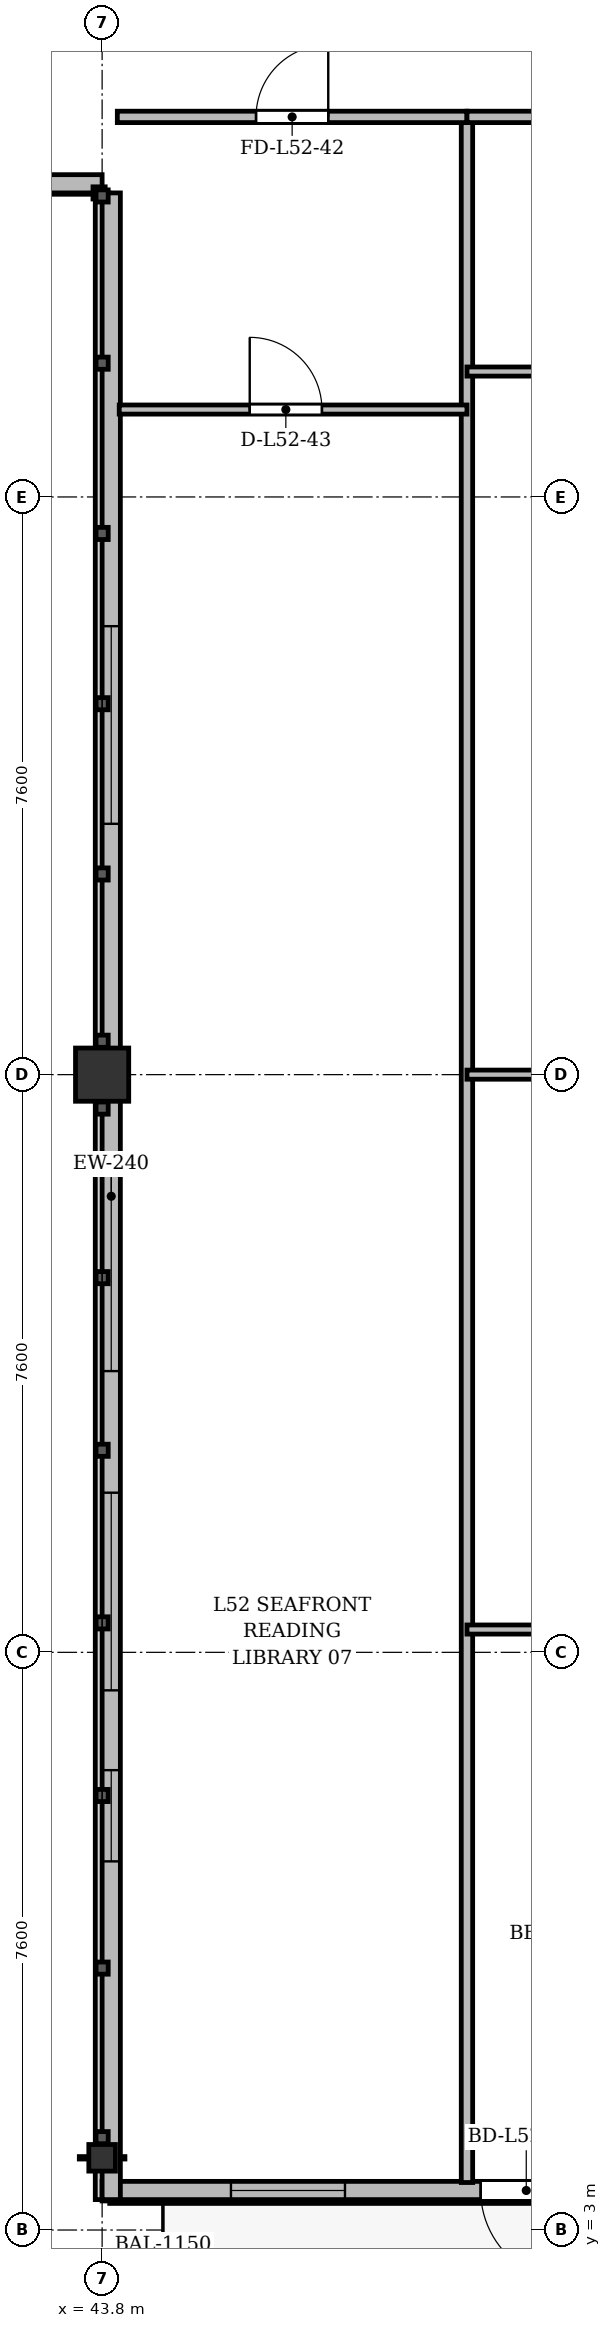
"""IFC4 building model, lengths in metres.
Left out: names, types, materials, properties, quantities, classifications, styles, units other than length and angle.
Written with IfcOpenShell. Run it as: python <this file> out.ifc"""

import sys

from ifc_helpers import new_model, si_unit, direction, frame, frame_2d, origin, origin_2d, place, context, subcontext, project, spatial, rectangle, i_section, extrude, source, transform, mapped, element, fill, save


model = new_model("IFC4")
c1 = context("Model", 3, precision=1e-05, world=origin(), true_north=direction((0.0, 1.0)))
c2 = subcontext(c1, "Body", "Model", "MODEL_VIEW")
j1 = project(units=[si_unit("LENGTHUNIT", "METRE"), si_unit("PLANEANGLEUNIT", "RADIAN")], contexts=[c1])
p1 = place(None, origin())
s1 = spatial("IfcSite", under=j1, at=p1, CompositionType="ELEMENT")
p2 = place(p1, origin())
s2 = spatial("IfcBuilding", under=s1, at=p2, CompositionType="ELEMENT")
p3 = place(p2, frame((0.0, 0.0, 201.3)))
s3 = spatial("IfcBuildingStorey", under=s2, at=p3, CompositionType="ELEMENT", Elevation=201.3)
m1 = source(origin(), c2, "Body", "SweptSolid", [
    extrude(i_section(OverallWidth=0.35, OverallDepth=0.35, WebThickness=0.018, FlangeThickness=0.028, at=origin_2d()), origin(), (0.0, 0.0, 1.0), 3.6),
])
p4 = place(p3, frame((43.8, 3.95, 0.0), z_axis=(0.0, 0.0, 1.0), x_axis=(1.0, 0.0, 0.0)))
e1 = element("IfcColumn", 1, at=p4, inside=s3, PredefinedType="COLUMN", context=c2, shape_type="MappedRepresentation", body=[
    mapped(m1, transform((0.0, 0.0, 0.0), x_axis=(1.0, 0.0, 0.0), y_axis=(0.0, 1.0, 0.0), z_axis=(0.0, 0.0, 1.0), scale=1.0)),
])
m2 = source(origin(), c2, "Body", "SweptSolid", [
    extrude(rectangle(XDim=0.7, YDim=0.7, at=origin_2d()), origin(), (0.0, 0.0, 1.0), 3.6),
])
p5 = place(p3, frame((43.8, 18.2, 0.0), z_axis=(0.0, 0.0, 1.0), x_axis=(1.0, 0.0, 0.0)))
e2 = element("IfcColumn", 2, at=p5, inside=s3, PredefinedType="COLUMN", context=c2, shape_type="MappedRepresentation", body=[
    mapped(m2, transform((0.0, 0.0, 0.0), x_axis=(1.0, 0.0, 0.0), y_axis=(0.0, 1.0, 0.0), z_axis=(0.0, 0.0, 1.0), scale=1.0)),
])
p6 = place(p3, frame((63.4, 3.52, 0.0), z_axis=(0.0, 0.0, 1.0), x_axis=(-1.0, 0.0, 0.0)))
e3 = element("IfcWall", 3, at=p6, inside=s3, PredefinedType="SOLIDWALL", context=c2, shape_type="SweptSolid", body=[
    extrude(rectangle(XDim=19.6, YDim=0.24, at=frame_2d((9.8, 0.0))), origin(), (0.0, 0.0, 1.0), 3.22),
])
p7 = place(p6, frame((0.395, 0.0, 0.9)))
e4 = element("IfcOpeningElement", 4, at=p7, cuts=e3, PredefinedType="OPENING", context=c2, shape_type="SweptSolid", body=[
    extrude(rectangle(XDim=0.9, YDim=1.65, at=frame_2d((0.45, 0.825))), frame((0.0, 0.13, 0.0), z_axis=(0.0, -1.0, 0.0), x_axis=(1.0, 0.0, 0.0)), (0.0, 0.0, 1.0), 0.26),
])
p8 = place(p6, frame((3.4, 0.0, 0.9)))
e5 = element("IfcOpeningElement", 5, at=p8, cuts=e3, PredefinedType="OPENING", context=c2, shape_type="SweptSolid", body=[
    extrude(rectangle(XDim=2.0, YDim=1.95, at=frame_2d((1.0, 0.975))), frame((0.0, 0.13, 0.0), z_axis=(0.0, -1.0, 0.0), x_axis=(1.0, 0.0, 0.0)), (0.0, 0.0, 1.0), 0.26),
])
p9 = place(p6, frame((7.45, 0.0, 0.9)))
e6 = element("IfcOpeningElement", 6, at=p9, cuts=e3, PredefinedType="OPENING", context=c2, shape_type="SweptSolid", body=[
    extrude(rectangle(XDim=1.5, YDim=1.75, at=frame_2d((0.75, 0.875))), frame((0.0, 0.13, 0.0), z_axis=(0.0, -1.0, 0.0), x_axis=(1.0, 0.0, 0.0)), (0.0, 0.0, 1.0), 0.26),
])
p10 = place(p6, frame((9.7, 0.0, 0.9)))
e7 = element("IfcOpeningElement", 7, at=p10, cuts=e3, PredefinedType="OPENING", context=c2, shape_type="SweptSolid", body=[
    extrude(rectangle(XDim=1.8, YDim=1.8, at=frame_2d((0.9, 0.9))), frame((0.0, 0.13, 0.0), z_axis=(0.0, -1.0, 0.0), x_axis=(1.0, 0.0, 0.0)), (0.0, 0.0, 1.0), 0.26),
])
p11 = place(p6, frame((13.42, 0.0, 0.0)))
e8 = element("IfcOpeningElement", 8, at=p11, cuts=e3, PredefinedType="OPENING", context=c2, shape_type="SweptSolid", body=[
    extrude(rectangle(XDim=1.2, YDim=2.2, at=frame_2d((0.6, 1.1))), frame((0.0, 0.13, 0.0), z_axis=(0.0, -1.0, 0.0), x_axis=(1.0, 0.0, 0.0)), (0.0, 0.0, 1.0), 0.26),
])
p12 = place(p6, frame((16.405, 0.0, 0.9)))
e9 = element("IfcOpeningElement", 9, at=p12, cuts=e3, PredefinedType="OPENING", context=c2, shape_type="SweptSolid", body=[
    extrude(rectangle(XDim=1.5, YDim=1.75, at=frame_2d((0.75, 0.875))), frame((0.0, 0.13, 0.0), z_axis=(0.0, -1.0, 0.0), x_axis=(1.0, 0.0, 0.0)), (0.0, 0.0, 1.0), 0.26),
])
p13 = place(p3, frame((43.92, 3.4, 0.0), z_axis=(0.0, 0.0, 1.0), x_axis=(0.0, 1.0, 0.0)))
e10 = element("IfcWall", 10, at=p13, inside=s3, PredefinedType="SOLIDWALL", context=c2, shape_type="SweptSolid", body=[
    extrude(rectangle(XDim=26.4, YDim=0.24, at=frame_2d((13.2, 0.0))), origin(), (0.0, 0.0, 1.0), 2.72),
])
p14 = place(p13, frame((4.45, 0.0, 0.92)))
e11 = element("IfcOpeningElement", 11, at=p14, cuts=e10, PredefinedType="OPENING", context=c2, shape_type="SweptSolid", body=[
    extrude(rectangle(XDim=1.2, YDim=1.65, at=frame_2d((0.6, 0.825))), frame((0.0, 0.13, 0.0), z_axis=(0.0, -1.0, 0.0), x_axis=(1.0, 0.0, 0.0)), (0.0, 0.0, 1.0), 0.26),
])
p15 = place(p13, frame((6.7, 0.0, 0.92)))
e12 = element("IfcOpeningElement", 12, at=p15, cuts=e10, PredefinedType="OPENING", context=c2, shape_type="SweptSolid", body=[
    extrude(rectangle(XDim=2.6, YDim=1.7, at=frame_2d((1.3, 0.85))), frame((0.0, 0.13, 0.0), z_axis=(0.0, -1.0, 0.0), x_axis=(1.0, 0.0, 0.0)), (0.0, 0.0, 1.0), 0.26),
])
p16 = place(p13, frame((10.9, 0.0, 0.92)))
e13 = element("IfcOpeningElement", 13, at=p16, cuts=e10, PredefinedType="OPENING", context=c2, shape_type="SweptSolid", body=[
    extrude(rectangle(XDim=2.6, YDim=1.7, at=frame_2d((1.3, 0.85))), frame((0.0, 0.13, 0.0), z_axis=(0.0, -1.0, 0.0), x_axis=(1.0, 0.0, 0.0)), (0.0, 0.0, 1.0), 0.26),
])
p17 = place(p13, frame((18.1, 0.0, 0.92)))
e14 = element("IfcOpeningElement", 14, at=p17, cuts=e10, PredefinedType="OPENING", context=c2, shape_type="SweptSolid", body=[
    extrude(rectangle(XDim=2.6, YDim=1.7, at=frame_2d((1.3, 0.85))), frame((0.0, 0.13, 0.0), z_axis=(0.0, -1.0, 0.0), x_axis=(1.0, 0.0, 0.0)), (0.0, 0.0, 1.0), 0.26),
])
p18 = place(p3, frame((43.8, 29.92, 0.0), z_axis=(0.0, 0.0, 1.0), x_axis=(-1.0, 0.0, 0.0)))
e15 = element("IfcWall", 15, at=p18, inside=s3, PredefinedType="SOLIDWALL", context=c2, shape_type="SweptSolid", body=[
    extrude(rectangle(XDim=13.2, YDim=0.24, at=frame_2d((6.6, 0.0))), origin(), (0.0, 0.0, 1.0), 2.72),
])
p19 = place(p18, frame((5.85, 0.0, 0.9)))
e16 = element("IfcOpeningElement", 16, at=p19, cuts=e15, PredefinedType="OPENING", context=c2, shape_type="SweptSolid", body=[
    extrude(rectangle(XDim=1.5, YDim=1.72, at=frame_2d((0.75, 0.86))), frame((0.0, 0.13, 0.0), z_axis=(0.0, -1.0, 0.0), x_axis=(1.0, 0.0, 0.0)), (0.0, 0.0, 1.0), 0.26),
])
p20 = place(p3, frame((48.6, 3.625, 0.0), z_axis=(0.0, 0.0, 1.0), x_axis=(0.0, 1.0, 0.0)))
e17 = element("IfcWall", 17, at=p20, inside=s3, PredefinedType="PARTITIONING", context=c2, shape_type="SweptSolid", body=[
    extrude(rectangle(XDim=27.175, YDim=0.15, at=frame_2d((13.587, 0.0))), origin(), (0.0, 0.0, 1.0), 2.77),
])
p21 = place(p3, frame((44.0, 30.8, 0.0), z_axis=(0.0, 0.0, 1.0), x_axis=(1.0, 0.0, 0.0)))
e18 = element("IfcWall", 18, at=p21, inside=s3, PredefinedType="PARTITIONING", context=c2, shape_type="SweptSolid", body=[
    extrude(rectangle(XDim=4.6, YDim=0.15, at=frame_2d((2.3, 0.0))), origin(), (0.0, 0.0, 1.0), 3.22),
])
p22 = place(p21, frame((1.825, 0.0, 0.0)))
e19 = element("IfcOpeningElement", 19, at=p22, cuts=e18, PredefinedType="OPENING", context=c2, shape_type="SweptSolid", body=[
    extrude(rectangle(XDim=0.95, YDim=2.15, at=frame_2d((0.475, 1.075))), frame((0.0, 0.085, 0.0), z_axis=(0.0, -1.0, 0.0), x_axis=(1.0, 0.0, 0.0)), (0.0, 0.0, 1.0), 0.17),
])
p23 = place(p3, frame((44.025, 26.95, 0.0), z_axis=(0.0, 0.0, 1.0), x_axis=(1.0, 0.0, 0.0)))
e20 = element("IfcWall", 20, at=p23, inside=s3, PredefinedType="PARTITIONING", context=c2, shape_type="SweptSolid", body=[
    extrude(rectangle(XDim=4.575, YDim=0.12, at=frame_2d((2.288, 0.0))), origin(), (0.0, 0.0, 1.0), 3.22),
])
p24 = place(p23, frame((1.717, 0.0, 0.0)))
e21 = element("IfcOpeningElement", 21, at=p24, cuts=e20, PredefinedType="OPENING", context=c2, shape_type="SweptSolid", body=[
    extrude(rectangle(XDim=0.95, YDim=2.15, at=frame_2d((0.475, 1.075))), frame((0.0, 0.07, 0.0), z_axis=(0.0, -1.0, 0.0), x_axis=(1.0, 0.0, 0.0)), (0.0, 0.0, 1.0), 0.14),
])
p25 = place(p3, frame((48.6, 18.2, 0.0), z_axis=(0.0, 0.0, 1.0), x_axis=(1.0, 0.0, 0.0)))
e22 = element("IfcWall", 22, at=p25, inside=s3, PredefinedType="PARTITIONING", context=c2, shape_type="SweptSolid", body=[
    extrude(rectangle(XDim=5.6, YDim=0.12, at=frame_2d((2.8, 0.0))), origin(), (0.0, 0.0, 1.0), 2.77),
])
p26 = place(p25, frame((3.344, 0.0, 0.0)))
e23 = element("IfcOpeningElement", 23, at=p26, cuts=e22, PredefinedType="OPENING", context=c2, shape_type="SweptSolid", body=[
    extrude(rectangle(XDim=0.95, YDim=2.15, at=frame_2d((0.475, 1.075))), frame((0.0, 0.07, 0.0), z_axis=(0.0, -1.0, 0.0), x_axis=(1.0, 0.0, 0.0)), (0.0, 0.0, 1.0), 0.14),
])
p27 = place(p3, frame((48.6, 27.45, 0.0), z_axis=(0.0, 0.0, 1.0), x_axis=(1.0, 0.0, 0.0)))
e24 = element("IfcWall", 24, at=p27, inside=s3, PredefinedType="PARTITIONING", context=c2, shape_type="SweptSolid", body=[
    extrude(rectangle(XDim=1.954, YDim=0.12, at=frame_2d((0.977, 0.0))), origin(), (0.0, 0.0, 1.0), 3.22),
])
p28 = place(p3, frame((48.6, 30.8, 0.0), z_axis=(0.0, 0.0, 1.0), x_axis=(1.0, 0.0, 0.0)))
e25 = element("IfcWall", 25, at=p28, inside=s3, PredefinedType="PARTITIONING", context=c2, shape_type="SweptSolid", body=[
    extrude(rectangle(XDim=5.6, YDim=0.15, at=frame_2d((2.8, 0.0))), origin(), (0.0, 0.0, 1.0), 2.72),
])
p29 = place(p28, frame((3.492, 0.0, 0.0)))
e26 = element("IfcOpeningElement", 26, at=p29, cuts=e25, PredefinedType="OPENING", context=c2, shape_type="SweptSolid", body=[
    extrude(rectangle(XDim=0.95, YDim=2.15, at=frame_2d((0.475, 1.075))), frame((0.0, 0.085, 0.0), z_axis=(0.0, -1.0, 0.0), x_axis=(1.0, 0.0, 0.0)), (0.0, 0.0, 1.0), 0.17),
])
p30 = place(p3, frame((48.6, 10.9, 0.0), z_axis=(0.0, 0.0, 1.0), x_axis=(1.0, 0.0, 0.0)))
e27 = element("IfcWall", 27, at=p30, inside=s3, PredefinedType="PARTITIONING", context=c2, shape_type="SweptSolid", body=[
    extrude(rectangle(XDim=2.8, YDim=0.12, at=frame_2d((1.4, 0.0))), origin(), (0.0, 0.0, 1.0), 2.72),
])
p31 = place(p30, frame((0.925, 0.0, 0.0)))
e28 = element("IfcOpeningElement", 28, at=p31, cuts=e27, PredefinedType="OPENING", context=c2, shape_type="SweptSolid", body=[
    extrude(rectangle(XDim=0.95, YDim=2.15, at=frame_2d((0.475, 1.075))), frame((0.0, 0.07, 0.0), z_axis=(0.0, -1.0, 0.0), x_axis=(1.0, 0.0, 0.0)), (0.0, 0.0, 1.0), 0.14),
])
m3 = source(origin(), c2, "Body", "SweptSolid", [
    extrude(rectangle(XDim=1.2, YDim=2.2, at=frame_2d((0.6, 1.1))), frame((0.0, 0.025, 0.0), z_axis=(0.0, -1.0, 0.0), x_axis=(1.0, 0.0, 0.0)), (0.0, 0.0, 1.0), 0.05),
])
p32 = place(p11, origin())
e29 = element("IfcDoor", 29, at=p32, inside=s3, OperationType="SINGLE_SWING_LEFT", PredefinedType="DOOR", context=c2, shape_type="MappedRepresentation", body=[
    mapped(m3, transform((0.0, 0.0, 0.0), x_axis=(1.0, 0.0, 0.0), y_axis=(0.0, 1.0, 0.0), z_axis=(0.0, 0.0, 1.0), scale=1.0)),
])
fill(e8, e29)
m4 = source(origin(), c2, "Body", "SweptSolid", [
    extrude(rectangle(XDim=1.5, YDim=1.75, at=frame_2d((0.75, 0.875))), frame((0.0, 0.03, 0.0), z_axis=(0.0, -1.0, 0.0), x_axis=(1.0, 0.0, 0.0)), (0.0, 0.0, 1.0), 0.06),
])
p33 = place(p12, origin())
e30 = element("IfcWindow", 30, at=p33, inside=s3, PartitioningType="SINGLE_PANEL", PredefinedType="WINDOW", context=c2, shape_type="MappedRepresentation", body=[
    mapped(m4, transform((0.0, 0.0, 0.0), x_axis=(1.0, 0.0, 0.0), y_axis=(0.0, 1.0, 0.0), z_axis=(0.0, 0.0, 1.0), scale=1.0)),
])
fill(e9, e30)
m5 = source(origin(), c2, "Body", "SweptSolid", [
    extrude(rectangle(XDim=1.2, YDim=1.65, at=frame_2d((0.6, 0.825))), frame((0.0, 0.03, 0.0), z_axis=(0.0, -1.0, 0.0), x_axis=(1.0, 0.0, 0.0)), (0.0, 0.0, 1.0), 0.06),
])
p34 = place(p14, origin())
e31 = element("IfcWindow", 31, at=p34, inside=s3, PartitioningType="SINGLE_PANEL", PredefinedType="WINDOW", context=c2, shape_type="MappedRepresentation", body=[
    mapped(m5, transform((0.0, 0.0, 0.0), x_axis=(1.0, 0.0, 0.0), y_axis=(0.0, 1.0, 0.0), z_axis=(0.0, 0.0, 1.0), scale=1.0)),
])
fill(e11, e31)
m6 = source(origin(), c2, "Body", "SweptSolid", [
    extrude(rectangle(XDim=2.6, YDim=1.7, at=frame_2d((1.3, 0.85))), frame((0.0, 0.03, 0.0), z_axis=(0.0, -1.0, 0.0), x_axis=(1.0, 0.0, 0.0)), (0.0, 0.0, 1.0), 0.06),
])
p35 = place(p15, origin())
e32 = element("IfcWindow", 32, at=p35, inside=s3, PartitioningType="SINGLE_PANEL", PredefinedType="WINDOW", context=c2, shape_type="MappedRepresentation", body=[
    mapped(m6, transform((0.0, 0.0, 0.0), x_axis=(1.0, 0.0, 0.0), y_axis=(0.0, 1.0, 0.0), z_axis=(0.0, 0.0, 1.0), scale=1.0)),
])
fill(e12, e32)
p36 = place(p16, origin())
e33 = element("IfcWindow", 33, at=p36, inside=s3, PartitioningType="SINGLE_PANEL", PredefinedType="WINDOW", context=c2, shape_type="MappedRepresentation", body=[
    mapped(m6, transform((0.0, 0.0, 0.0), x_axis=(1.0, 0.0, 0.0), y_axis=(0.0, 1.0, 0.0), z_axis=(0.0, 0.0, 1.0), scale=1.0)),
])
fill(e13, e33)
p37 = place(p17, origin())
e34 = element("IfcWindow", 34, at=p37, inside=s3, PartitioningType="SINGLE_PANEL", PredefinedType="WINDOW", context=c2, shape_type="MappedRepresentation", body=[
    mapped(m6, transform((0.0, 0.0, 0.0), x_axis=(1.0, 0.0, 0.0), y_axis=(0.0, 1.0, 0.0), z_axis=(0.0, 0.0, 1.0), scale=1.0)),
])
fill(e14, e34)
m7 = source(origin(), c2, "Body", "SweptSolid", [
    extrude(rectangle(XDim=0.95, YDim=2.15, at=frame_2d((0.475, 1.075))), frame((0.0, 0.025, 0.0), z_axis=(0.0, -1.0, 0.0), x_axis=(1.0, 0.0, 0.0)), (0.0, 0.0, 1.0), 0.05),
])
p38 = place(p22, origin())
e35 = element("IfcDoor", 35, at=p38, inside=s3, OperationType="SINGLE_SWING_RIGHT", PredefinedType="DOOR", context=c2, shape_type="MappedRepresentation", body=[
    mapped(m7, transform((0.0, 0.0, 0.0), x_axis=(1.0, 0.0, 0.0), y_axis=(0.0, 1.0, 0.0), z_axis=(0.0, 0.0, 1.0), scale=1.0)),
])
fill(e19, e35)
p39 = place(p24, origin())
e36 = element("IfcDoor", 36, at=p39, inside=s3, OperationType="SINGLE_SWING_LEFT", PredefinedType="DOOR", context=c2, shape_type="MappedRepresentation", body=[
    mapped(m7, transform((0.0, 0.0, 0.0), x_axis=(1.0, 0.0, 0.0), y_axis=(0.0, 1.0, 0.0), z_axis=(0.0, 0.0, 1.0), scale=1.0)),
])
fill(e21, e36)
save(model, sys.argv[1])
